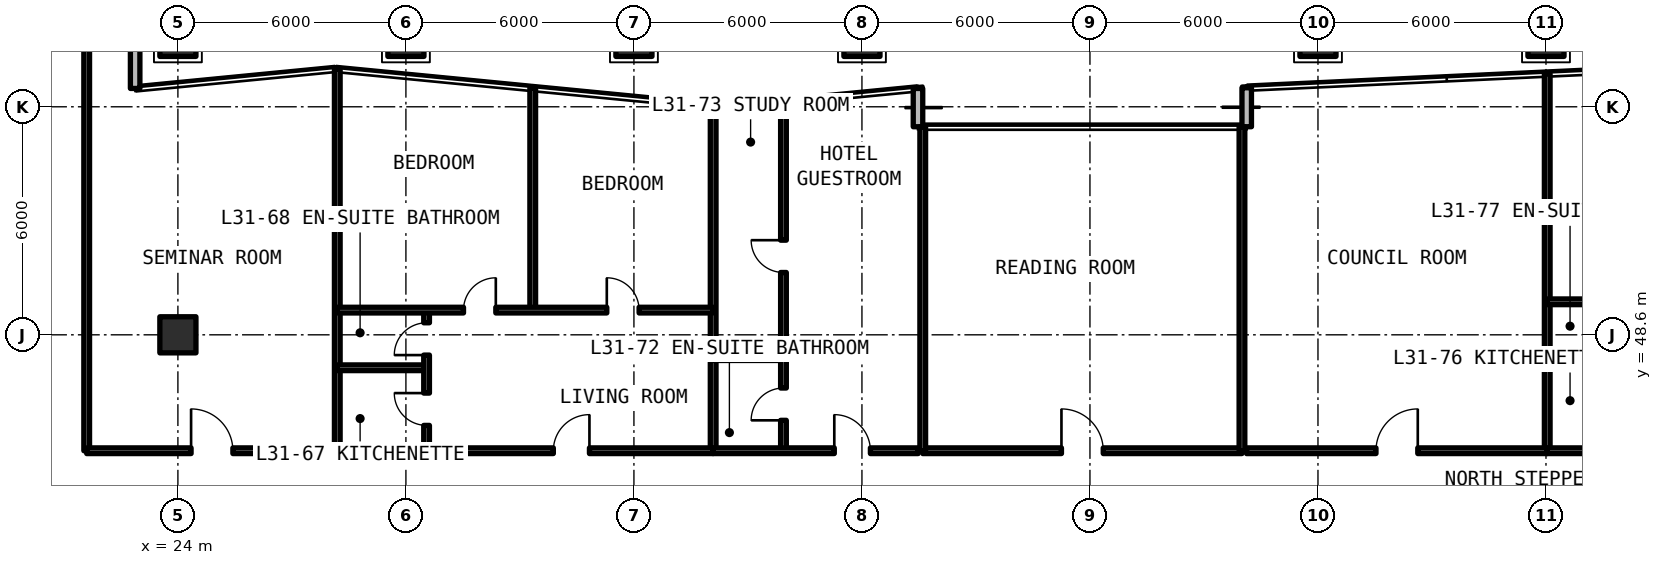
"""IFC4 building model, lengths in metres.
Left out: names, types, materials, properties, quantities, classifications, styles, units other than length and angle.
Written with IfcOpenShell. Run it as: python <this file> out.ifc"""

import sys

from ifc_helpers import new_model, si_unit, direction, frame, frame_2d, origin, origin_2d, place, context, subcontext, project, spatial, rectangle, extrude, element, fill, save


model = new_model("IFC4")
c1 = context("Model", 3, precision=1e-05, world=origin(), true_north=direction((0.0, 1.0)))
c2 = subcontext(c1, "Body", "Model", "MODEL_VIEW")
j1 = project(units=[si_unit("LENGTHUNIT", "METRE"), si_unit("PLANEANGLEUNIT", "RADIAN")], contexts=[c1])
p1 = place(None, origin())
s1 = spatial("IfcSite", under=j1, at=p1, CompositionType="ELEMENT")
p2 = place(p1, origin())
s2 = spatial("IfcBuilding", under=s1, at=p2, CompositionType="ELEMENT")
p3 = place(p2, frame((0.0, 0.0, 112.2)))
s3 = spatial("IfcBuildingStorey", under=s2, at=p3, CompositionType="ELEMENT", Elevation=112.2)
for number, where, z_axis, x_axis in (
    (1, (24.0, 48.6, 0.0), (0.0, 0.0, 1.0), (1.0, 0.0, 0.0)),
    (2, (24.0, 56.4, 0.0), (0.0, 0.0, 1.0), (1.0, 0.0, 0.0)),
    (3, (30.0, 56.4, 0.0), (0.0, 0.0, 1.0), (1.0, 0.0, 0.0)),
    (4, (36.0, 56.4, 0.0), (0.0, 0.0, 1.0), (1.0, 0.0, 0.0)),
    (5, (42.0, 56.4, 0.0), (0.0, 0.0, 1.0), (1.0, 0.0, 0.0)),
    (6, (54.0, 56.4, 0.0), (0.0, 0.0, 1.0), (1.0, 0.0, 0.0)),
    (7, (60.0, 56.4, 0.0), (0.0, 0.0, 1.0), (1.0, 0.0, 0.0)),
):
    element("IfcColumn", number, at=place(p3, frame(where, z_axis=z_axis, x_axis=x_axis)), inside=s3, PredefinedType="COLUMN", context=c2, shape_type="SweptSolid", body=[
        extrude(rectangle(XDim=0.95, YDim=0.95, at=origin_2d()), origin(), (0.0, 0.0, 1.0), 3.63),
    ])
p4 = place(p3, frame((52.125, 55.101, 0.0), z_axis=(0.0, 0.0, 1.0), x_axis=(0.0, -1.0, 0.0)))
e8 = element("IfcWall", 8, at=p4, inside=s3, PredefinedType="SOLIDWALL", context=c2, shape_type="SweptSolid", body=[
    extrude(rectangle(XDim=1.026, YDim=0.25, at=frame_2d((0.513, 0.0))), origin(), (0.0, 0.0, 1.0), 3.41),
])
p5 = place(p3, frame((43.475, 54.075, 0.0), z_axis=(0.0, 0.0, 1.0), x_axis=(0.0, 1.0, 0.0)))
e9 = element("IfcWall", 9, at=p5, inside=s3, PredefinedType="SOLIDWALL", context=c2, shape_type="SweptSolid", body=[
    extrude(rectangle(XDim=1.007, YDim=0.25, at=frame_2d((0.504, 0.0))), origin(), (0.0, 0.0, 1.0), 3.41),
])
p6 = place(p3, frame((22.875, 55.082, 0.0), z_axis=(0.0, 0.0, 1.0), x_axis=(0.0, 1.0, 0.0)))
e10 = element("IfcWall", 10, at=p6, inside=s3, PredefinedType="SOLIDWALL", context=c2, shape_type="SweptSolid", body=[
    extrude(rectangle(XDim=2.393, YDim=0.25, at=frame_2d((1.196, 0.0))), origin(), (0.0, 0.0, 1.0), 3.41),
])
p7 = place(p3, frame((43.6, 45.55, 0.0), z_axis=(0.0, 0.0, 1.0), x_axis=(1.0, 0.0, 0.0)))
e11 = element("IfcWall", 11, at=p7, inside=s3, PredefinedType="SOLIDWALL", context=c2, shape_type="SweptSolid", body=[
    extrude(rectangle(XDim=8.4, YDim=0.15, at=frame_2d((4.2, 0.0))), origin(), (0.0, 0.0, 1.0), 2.63),
])
p8 = place(p7, frame((3.65, 0.0, 0.0)))
e12 = element("IfcOpeningElement", 12, at=p8, cuts=e11, PredefinedType="OPENING", context=c2, shape_type="SweptSolid", body=[
    extrude(rectangle(XDim=1.1, YDim=2.15, at=frame_2d((0.55, 1.075))), frame((0.0, 0.085, 0.0), z_axis=(0.0, -1.0, 0.0), x_axis=(1.0, 0.0, 0.0)), (0.0, 0.0, 1.0), 0.17),
])
for number, where, z_axis, x_axis in (
    (13, (43.6, 45.55, 0.0), (0.0, 0.0, 1.0), (0.0, 1.0, 0.0)),
    (14, (52.0, 45.55, 0.0), (0.0, 0.0, 1.0), (0.0, 1.0, 0.0)),
):
    element("IfcWall", number, at=place(p3, frame(where, z_axis=z_axis, x_axis=x_axis)), inside=s3, PredefinedType="SOLIDWALL", context=c2, shape_type="SweptSolid", body=[
        extrude(rectangle(XDim=8.525, YDim=0.15, at=frame_2d((4.262, 0.0))), origin(), (0.0, 0.0, 1.0), 2.63),
    ])
p9 = place(p3, frame((21.6, 45.55, 0.0), z_axis=(0.0, 0.0, 1.0), x_axis=(0.0, 1.0, 0.0)))
e15 = element("IfcWall", 15, at=p9, inside=s3, PredefinedType="SOLIDWALL", context=c2, shape_type="SweptSolid", body=[
    extrude(rectangle(XDim=11.925, YDim=0.15, at=frame_2d((5.962, 0.0))), origin(), (0.0, 0.0, 1.0), 2.63),
])
p10 = place(p3, frame((28.194, 45.55, 0.0), z_axis=(0.0, 0.0, 1.0), x_axis=(0.0, 1.0, 0.0)))
e16 = element("IfcWall", 16, at=p10, inside=s3, PredefinedType="SOLIDWALL", context=c2, shape_type="SweptSolid", body=[
    extrude(rectangle(XDim=10.04, YDim=0.15, at=frame_2d((5.02, 0.0))), origin(), (0.0, 0.0, 1.0), 2.63),
])
p11 = place(p3, frame((21.6, 45.55, 0.0), z_axis=(0.0, 0.0, 1.0), x_axis=(1.0, 0.0, 0.0)))
e17 = element("IfcWall", 17, at=p11, inside=s3, PredefinedType="SOLIDWALL", context=c2, shape_type="SweptSolid", body=[
    extrude(rectangle(XDim=6.594, YDim=0.15, at=frame_2d((3.297, 0.0))), origin(), (0.0, 0.0, 1.0), 2.63),
])
p12 = place(p11, frame((2.747, 0.0, 0.0)))
e18 = element("IfcOpeningElement", 18, at=p12, cuts=e17, PredefinedType="OPENING", context=c2, shape_type="SweptSolid", body=[
    extrude(rectangle(XDim=1.1, YDim=2.15, at=frame_2d((0.55, 1.075))), frame((0.0, 0.085, 0.0), z_axis=(0.0, -1.0, 0.0), x_axis=(1.0, 0.0, 0.0)), (0.0, 0.0, 1.0), 0.17),
])
p13 = place(p3, frame((38.085, 45.55, 0.0), z_axis=(0.0, 0.0, 1.0), x_axis=(0.0, 1.0, 0.0)))
e19 = element("IfcWall", 19, at=p13, inside=s3, PredefinedType="SOLIDWALL", context=c2, shape_type="SweptSolid", body=[
    extrude(rectangle(XDim=9.08, YDim=0.15, at=frame_2d((4.54, 0.0))), origin(), (0.0, 0.0, 1.0), 2.63),
])
p14 = place(p3, frame((28.194, 47.733, 0.0), z_axis=(0.0, 0.0, 1.0), x_axis=(1.0, 0.0, 0.0)))
e20 = element("IfcWall", 20, at=p14, inside=s3, PredefinedType="PARTITIONING", context=c2, shape_type="SweptSolid", body=[
    extrude(rectangle(XDim=2.35, YDim=0.15, at=frame_2d((1.175, 0.0))), origin(), (0.0, 0.0, 1.0), 2.63),
])
p15 = place(p3, frame((30.544, 45.55, 0.0), z_axis=(0.0, 0.0, 1.0), x_axis=(0.0, 1.0, 0.0)))
e21 = element("IfcWall", 21, at=p15, inside=s3, PredefinedType="PARTITIONING", context=c2, shape_type="SweptSolid", body=[
    extrude(rectangle(XDim=3.7, YDim=0.15, at=frame_2d((1.85, 0.0))), origin(), (0.0, 0.0, 1.0), 2.63),
])
p16 = place(p15, frame((0.667, 0.0, 0.0)))
e22 = element("IfcOpeningElement", 22, at=p16, cuts=e21, PredefinedType="OPENING", context=c2, shape_type="SweptSolid", body=[
    extrude(rectangle(XDim=0.85, YDim=2.1, at=frame_2d((0.425, 1.05))), frame((0.0, 0.085, 0.0), z_axis=(0.0, -1.0, 0.0), x_axis=(1.0, 0.0, 0.0)), (0.0, 0.0, 1.0), 0.17),
])
p17 = place(p15, frame((2.517, 0.0, 0.0)))
e23 = element("IfcOpeningElement", 23, at=p17, cuts=e21, PredefinedType="OPENING", context=c2, shape_type="SweptSolid", body=[
    extrude(rectangle(XDim=0.85, YDim=2.1, at=frame_2d((0.425, 1.05))), frame((0.0, 0.085, 0.0), z_axis=(0.0, -1.0, 0.0), x_axis=(1.0, 0.0, 0.0)), (0.0, 0.0, 1.0), 0.17),
])
p18 = place(p3, frame((33.337, 49.25, 0.0), z_axis=(0.0, 0.0, 1.0), x_axis=(0.0, 1.0, 0.0)))
e24 = element("IfcWall", 24, at=p18, inside=s3, PredefinedType="PARTITIONING", context=c2, shape_type="SweptSolid", body=[
    extrude(rectangle(XDim=5.841, YDim=0.15, at=frame_2d((2.92, 0.0))), origin(), (0.0, 0.0, 1.0), 2.63),
])
p19 = place(p3, frame((28.194, 49.25, 0.0), z_axis=(0.0, 0.0, 1.0), x_axis=(1.0, 0.0, 0.0)))
e25 = element("IfcWall", 25, at=p19, inside=s3, PredefinedType="PARTITIONING", context=c2, shape_type="SweptSolid", body=[
    extrude(rectangle(XDim=9.891, YDim=0.15, at=frame_2d((4.945, 0.0))), origin(), (0.0, 0.0, 1.0), 2.63),
])
p20 = place(p19, frame((3.322, 0.0, 0.0)))
e26 = element("IfcOpeningElement", 26, at=p20, cuts=e25, PredefinedType="OPENING", context=c2, shape_type="SweptSolid", body=[
    extrude(rectangle(XDim=0.85, YDim=2.1, at=frame_2d((0.425, 1.05))), frame((0.0, 0.085, 0.0), z_axis=(0.0, -1.0, 0.0), x_axis=(1.0, 0.0, 0.0)), (0.0, 0.0, 1.0), 0.17),
])
p21 = place(p19, frame((7.092, 0.0, 0.0)))
e27 = element("IfcOpeningElement", 27, at=p21, cuts=e25, PredefinedType="OPENING", context=c2, shape_type="SweptSolid", body=[
    extrude(rectangle(XDim=0.85, YDim=2.1, at=frame_2d((0.425, 1.05))), frame((0.0, 0.085, 0.0), z_axis=(0.0, -1.0, 0.0), x_axis=(1.0, 0.0, 0.0)), (0.0, 0.0, 1.0), 0.17),
])
p22 = place(p3, frame((28.194, 45.55, 0.0), z_axis=(0.0, 0.0, 1.0), x_axis=(1.0, 0.0, 0.0)))
e28 = element("IfcWall", 28, at=p22, inside=s3, PredefinedType="SOLIDWALL", context=c2, shape_type="SweptSolid", body=[
    extrude(rectangle(XDim=9.891, YDim=0.15, at=frame_2d((4.945, 0.0))), origin(), (0.0, 0.0, 1.0), 2.63),
])
p23 = place(p22, frame((5.686, 0.0, 0.0)))
e29 = element("IfcOpeningElement", 29, at=p23, cuts=e28, PredefinedType="OPENING", context=c2, shape_type="SweptSolid", body=[
    extrude(rectangle(XDim=0.95, YDim=2.15, at=frame_2d((0.475, 1.075))), frame((0.0, 0.085, 0.0), z_axis=(0.0, -1.0, 0.0), x_axis=(1.0, 0.0, 0.0)), (0.0, 0.0, 1.0), 0.17),
])
p24 = place(p3, frame((38.085, 48.0, 0.0), z_axis=(0.0, 0.0, 1.0), x_axis=(1.0, 0.0, 0.0)))
e30 = element("IfcWall", 30, at=p24, inside=s3, PredefinedType="PARTITIONING", context=c2, shape_type="SweptSolid", body=[
    extrude(rectangle(XDim=1.85, YDim=0.15, at=frame_2d((0.925, 0.0))), origin(), (0.0, 0.0, 1.0), 2.63),
])
p25 = place(p3, frame((39.935, 45.55, 0.0), z_axis=(0.0, 0.0, 1.0), x_axis=(0.0, 1.0, 0.0)))
e31 = element("IfcWall", 31, at=p25, inside=s3, PredefinedType="PARTITIONING", context=c2, shape_type="SweptSolid", body=[
    extrude(rectangle(XDim=9.188, YDim=0.15, at=frame_2d((4.594, 0.0))), origin(), (0.0, 0.0, 1.0), 2.63),
])
p26 = place(p25, frame((0.8, 0.0, 0.0)))
e32 = element("IfcOpeningElement", 32, at=p26, cuts=e31, PredefinedType="OPENING", context=c2, shape_type="SweptSolid", body=[
    extrude(rectangle(XDim=0.85, YDim=2.1, at=frame_2d((0.425, 1.05))), frame((0.0, 0.085, 0.0), z_axis=(0.0, -1.0, 0.0), x_axis=(1.0, 0.0, 0.0)), (0.0, 0.0, 1.0), 0.17),
])
p27 = place(p25, frame((4.69, 0.0, 0.0)))
e33 = element("IfcOpeningElement", 33, at=p27, cuts=e31, PredefinedType="OPENING", context=c2, shape_type="SweptSolid", body=[
    extrude(rectangle(XDim=0.85, YDim=2.1, at=frame_2d((0.425, 1.05))), frame((0.0, 0.085, 0.0), z_axis=(0.0, -1.0, 0.0), x_axis=(1.0, 0.0, 0.0)), (0.0, 0.0, 1.0), 0.17),
])
p28 = place(p3, frame((38.085, 45.55, 0.0), z_axis=(0.0, 0.0, 1.0), x_axis=(1.0, 0.0, 0.0)))
e34 = element("IfcWall", 34, at=p28, inside=s3, PredefinedType="SOLIDWALL", context=c2, shape_type="SweptSolid", body=[
    extrude(rectangle(XDim=5.395, YDim=0.15, at=frame_2d((2.698, 0.0))), origin(), (0.0, 0.0, 1.0), 2.63),
])
p29 = place(p28, frame((3.188, 0.0, 0.0)))
e35 = element("IfcOpeningElement", 35, at=p29, cuts=e34, PredefinedType="OPENING", context=c2, shape_type="SweptSolid", body=[
    extrude(rectangle(XDim=0.95, YDim=2.15, at=frame_2d((0.475, 1.075))), frame((0.0, 0.085, 0.0), z_axis=(0.0, -1.0, 0.0), x_axis=(1.0, 0.0, 0.0)), (0.0, 0.0, 1.0), 0.17),
])
p30 = place(p3, frame((60.033, 45.55, 0.0), z_axis=(0.0, 0.0, 1.0), x_axis=(0.0, 1.0, 0.0)))
e36 = element("IfcWall", 36, at=p30, inside=s3, PredefinedType="SOLIDWALL", context=c2, shape_type="SweptSolid", body=[
    extrude(rectangle(XDim=9.922, YDim=0.15, at=frame_2d((4.961, 0.0))), origin(), (0.0, 0.0, 1.0), 2.63),
])
p31 = place(p3, frame((52.12, 45.55, 0.0), z_axis=(0.0, 0.0, 1.0), x_axis=(1.0, 0.0, 0.0)))
e37 = element("IfcWall", 37, at=p31, inside=s3, PredefinedType="SOLIDWALL", context=c2, shape_type="SweptSolid", body=[
    extrude(rectangle(XDim=7.913, YDim=0.15, at=frame_2d((3.956, 0.0))), origin(), (0.0, 0.0, 1.0), 2.63),
])
p32 = place(p31, frame((3.406, 0.0, 0.0)))
e38 = element("IfcOpeningElement", 38, at=p32, cuts=e37, PredefinedType="OPENING", context=c2, shape_type="SweptSolid", body=[
    extrude(rectangle(XDim=1.1, YDim=2.15, at=frame_2d((0.55, 1.075))), frame((0.0, 0.085, 0.0), z_axis=(0.0, -1.0, 0.0), x_axis=(1.0, 0.0, 0.0)), (0.0, 0.0, 1.0), 0.17),
])
p33 = place(p3, frame((60.033, 47.862, 0.0), z_axis=(0.0, 0.0, 1.0), x_axis=(1.0, 0.0, 0.0)))
e39 = element("IfcWall", 39, at=p33, inside=s3, PredefinedType="PARTITIONING", context=c2, shape_type="SweptSolid", body=[
    extrude(rectangle(XDim=2.35, YDim=0.15, at=frame_2d((1.175, 0.0))), origin(), (0.0, 0.0, 1.0), 2.63),
])
p34 = place(p3, frame((60.033, 49.469, 0.0), z_axis=(0.0, 0.0, 1.0), x_axis=(1.0, 0.0, 0.0)))
e40 = element("IfcWall", 40, at=p34, inside=s3, PredefinedType="PARTITIONING", context=c2, shape_type="SweptSolid", body=[
    extrude(rectangle(XDim=10.551, YDim=0.15, at=frame_2d((5.275, 0.0))), origin(), (0.0, 0.0, 1.0), 2.63),
])
p35 = place(p34, frame((3.493, 0.0, 0.0)))
e41 = element("IfcOpeningElement", 41, at=p35, cuts=e40, PredefinedType="OPENING", context=c2, shape_type="SweptSolid", body=[
    extrude(rectangle(XDim=0.85, YDim=2.1, at=frame_2d((0.425, 1.05))), frame((0.0, 0.085, 0.0), z_axis=(0.0, -1.0, 0.0), x_axis=(1.0, 0.0, 0.0)), (0.0, 0.0, 1.0), 0.17),
])
p36 = place(p34, frame((7.593, 0.0, 0.0)))
e42 = element("IfcOpeningElement", 42, at=p36, cuts=e40, PredefinedType="OPENING", context=c2, shape_type="SweptSolid", body=[
    extrude(rectangle(XDim=0.85, YDim=2.1, at=frame_2d((0.425, 1.05))), frame((0.0, 0.085, 0.0), z_axis=(0.0, -1.0, 0.0), x_axis=(1.0, 0.0, 0.0)), (0.0, 0.0, 1.0), 0.17),
])
p37 = place(p3, frame((60.033, 45.55, 0.0), z_axis=(0.0, 0.0, 1.0), x_axis=(1.0, 0.0, 0.0)))
e43 = element("IfcWall", 43, at=p37, inside=s3, PredefinedType="SOLIDWALL", context=c2, shape_type="SweptSolid", body=[
    extrude(rectangle(XDim=10.551, YDim=0.15, at=frame_2d((5.275, 0.0))), origin(), (0.0, 0.0, 1.0), 2.63),
])
p38 = place(p37, frame((6.015, 0.0, 0.0)))
e44 = element("IfcOpeningElement", 44, at=p38, cuts=e43, PredefinedType="OPENING", context=c2, shape_type="SweptSolid", body=[
    extrude(rectangle(XDim=0.95, YDim=2.15, at=frame_2d((0.475, 1.075))), frame((0.0, 0.085, 0.0), z_axis=(0.0, -1.0, 0.0), x_axis=(1.0, 0.0, 0.0)), (0.0, 0.0, 1.0), 0.17),
])
p39 = place(p8, origin())
e45 = element("IfcDoor", 45, at=p39, inside=s3, OperationType="SINGLE_SWING_LEFT", PredefinedType="DOOR", context=c2, shape_type="SweptSolid", body=[
    extrude(rectangle(XDim=1.1, YDim=2.15, at=frame_2d((0.55, 1.075))), frame((0.0, 0.025, 0.0), z_axis=(0.0, -1.0, 0.0), x_axis=(1.0, 0.0, 0.0)), (0.0, 0.0, 1.0), 0.05),
])
fill(e12, e45)
p40 = place(p12, origin())
e46 = element("IfcDoor", 46, at=p40, inside=s3, OperationType="SINGLE_SWING_LEFT", PredefinedType="DOOR", context=c2, shape_type="SweptSolid", body=[
    extrude(rectangle(XDim=1.1, YDim=2.15, at=frame_2d((0.55, 1.075))), frame((0.0, 0.025, 0.0), z_axis=(0.0, -1.0, 0.0), x_axis=(1.0, 0.0, 0.0)), (0.0, 0.0, 1.0), 0.05),
])
fill(e18, e46)
p41 = place(p16, origin())
e47 = element("IfcDoor", 47, at=p41, inside=s3, OperationType="SINGLE_SWING_RIGHT", PredefinedType="DOOR", context=c2, shape_type="SweptSolid", body=[
    extrude(rectangle(XDim=0.85, YDim=2.1, at=frame_2d((0.425, 1.05))), frame((0.0, 0.025, 0.0), z_axis=(0.0, -1.0, 0.0), x_axis=(1.0, 0.0, 0.0)), (0.0, 0.0, 1.0), 0.05),
])
fill(e22, e47)
p42 = place(p17, origin())
e48 = element("IfcDoor", 48, at=p42, inside=s3, OperationType="SINGLE_SWING_LEFT", PredefinedType="DOOR", context=c2, shape_type="SweptSolid", body=[
    extrude(rectangle(XDim=0.85, YDim=2.1, at=frame_2d((0.425, 1.05))), frame((0.0, 0.025, 0.0), z_axis=(0.0, -1.0, 0.0), x_axis=(1.0, 0.0, 0.0)), (0.0, 0.0, 1.0), 0.05),
])
fill(e23, e48)
p43 = place(p20, origin())
e49 = element("IfcDoor", 49, at=p43, inside=s3, OperationType="SINGLE_SWING_RIGHT", PredefinedType="DOOR", context=c2, shape_type="SweptSolid", body=[
    extrude(rectangle(XDim=0.85, YDim=2.1, at=frame_2d((0.425, 1.05))), frame((0.0, 0.025, 0.0), z_axis=(0.0, -1.0, 0.0), x_axis=(1.0, 0.0, 0.0)), (0.0, 0.0, 1.0), 0.05),
])
fill(e26, e49)
p44 = place(p21, origin())
e50 = element("IfcDoor", 50, at=p44, inside=s3, OperationType="SINGLE_SWING_LEFT", PredefinedType="DOOR", context=c2, shape_type="SweptSolid", body=[
    extrude(rectangle(XDim=0.85, YDim=2.1, at=frame_2d((0.425, 1.05))), frame((0.0, 0.025, 0.0), z_axis=(0.0, -1.0, 0.0), x_axis=(1.0, 0.0, 0.0)), (0.0, 0.0, 1.0), 0.05),
])
fill(e27, e50)
p45 = place(p23, origin())
e51 = element("IfcDoor", 51, at=p45, inside=s3, OperationType="SINGLE_SWING_RIGHT", PredefinedType="DOOR", context=c2, shape_type="SweptSolid", body=[
    extrude(rectangle(XDim=0.95, YDim=2.15, at=frame_2d((0.475, 1.075))), frame((0.0, 0.025, 0.0), z_axis=(0.0, -1.0, 0.0), x_axis=(1.0, 0.0, 0.0)), (0.0, 0.0, 1.0), 0.05),
])
fill(e29, e51)
p46 = place(p26, origin())
e52 = element("IfcDoor", 52, at=p46, inside=s3, OperationType="SINGLE_SWING_LEFT", PredefinedType="DOOR", context=c2, shape_type="SweptSolid", body=[
    extrude(rectangle(XDim=0.85, YDim=2.1, at=frame_2d((0.425, 1.05))), frame((0.0, 0.025, 0.0), z_axis=(0.0, -1.0, 0.0), x_axis=(1.0, 0.0, 0.0)), (0.0, 0.0, 1.0), 0.05),
])
fill(e32, e52)
p47 = place(p27, origin())
e53 = element("IfcDoor", 53, at=p47, inside=s3, OperationType="SINGLE_SWING_RIGHT", PredefinedType="DOOR", context=c2, shape_type="SweptSolid", body=[
    extrude(rectangle(XDim=0.85, YDim=2.1, at=frame_2d((0.425, 1.05))), frame((0.0, 0.025, 0.0), z_axis=(0.0, -1.0, 0.0), x_axis=(1.0, 0.0, 0.0)), (0.0, 0.0, 1.0), 0.05),
])
fill(e33, e53)
p48 = place(p29, origin())
e54 = element("IfcDoor", 54, at=p48, inside=s3, OperationType="SINGLE_SWING_LEFT", PredefinedType="DOOR", context=c2, shape_type="SweptSolid", body=[
    extrude(rectangle(XDim=0.95, YDim=2.15, at=frame_2d((0.475, 1.075))), frame((0.0, 0.025, 0.0), z_axis=(0.0, -1.0, 0.0), x_axis=(1.0, 0.0, 0.0)), (0.0, 0.0, 1.0), 0.05),
])
fill(e35, e54)
p49 = place(p32, origin())
e55 = element("IfcDoor", 55, at=p49, inside=s3, OperationType="SINGLE_SWING_RIGHT", PredefinedType="DOOR", context=c2, shape_type="SweptSolid", body=[
    extrude(rectangle(XDim=1.1, YDim=2.15, at=frame_2d((0.55, 1.075))), frame((0.0, 0.025, 0.0), z_axis=(0.0, -1.0, 0.0), x_axis=(1.0, 0.0, 0.0)), (0.0, 0.0, 1.0), 0.05),
])
fill(e38, e55)
save(model, sys.argv[1])
